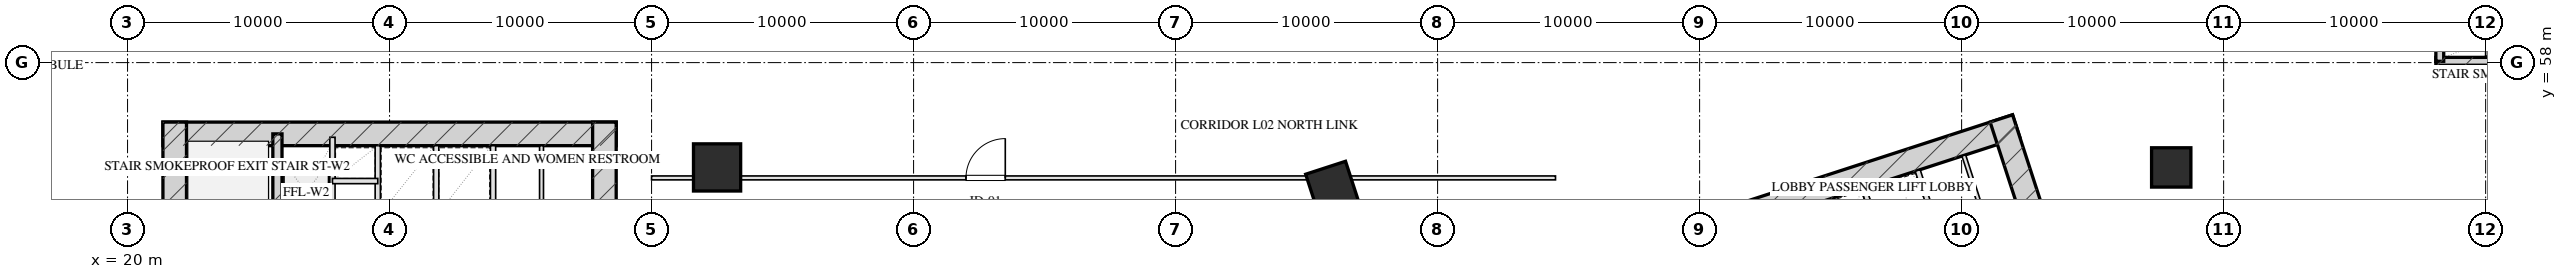
"""IFC4 building model, lengths in metres.
Left out: names, types, materials, properties, quantities, classifications, styles, units other than length and angle.
Written with IfcOpenShell. Run it as: python <this file> out.ifc"""

import sys

from ifc_helpers import new_model, si_unit, direction, frame, frame_2d, origin, origin_2d, place, context, subcontext, project, spatial, rectangle, hollow_rectangle, extrude, element, fill, save


model = new_model("IFC4")
c1 = context("Model", 3, precision=1e-05, world=origin(), true_north=direction((0.0, 1.0)))
c2 = subcontext(c1, "Body", "Model", "MODEL_VIEW")
j1 = project(units=[si_unit("LENGTHUNIT", "METRE"), si_unit("PLANEANGLEUNIT", "RADIAN")], contexts=[c1])
p1 = place(None, origin())
s1 = spatial("IfcSite", under=j1, at=p1, CompositionType="ELEMENT")
p2 = place(p1, origin())
s2 = spatial("IfcBuilding", under=s1, at=p2, CompositionType="ELEMENT")
p3 = place(p2, frame((0.0, 0.0, 11.5)))
s3 = spatial("IfcBuildingStorey", under=s2, at=p3, CompositionType="ELEMENT", Elevation=11.5)
p4 = place(p3, frame((21.35, 55.28, 0.0), z_axis=(0.0, 0.0, 1.0), x_axis=(1.0, 0.0, 0.0)))
e1 = element("IfcWall", 1, at=p4, inside=s3, PredefinedType="SHEAR", context=c2, shape_type="SweptSolid", body=[
    extrude(rectangle(XDim=17.3, YDim=0.9, at=frame_2d((8.65, 0.0))), origin(), (0.0, 0.0, 1.0), 5.0),
])
for number, where, z_axis, x_axis in (
    (2, (21.8, 45.95, 0.0), (0.0, 0.0, 1.0), (0.0, 1.0, 0.0)),
    (3, (38.2, 45.95, 0.0), (0.0, 0.0, 1.0), (0.0, 1.0, 0.0)),
):
    element("IfcWall", number, at=place(p3, frame(where, z_axis=z_axis, x_axis=x_axis)), inside=s3, PredefinedType="SHEAR", context=c2, shape_type="SweptSolid", body=[
        extrude(rectangle(XDim=9.78, YDim=0.9, at=frame_2d((4.89, 0.0))), origin(), (0.0, 0.0, 1.0), 5.0),
    ])
p5 = place(p3, frame((25.72, 48.3, 0.0), z_axis=(0.0, 0.0, 1.0), x_axis=(0.0, 1.0, 0.0)))
e4 = element("IfcWall", 4, at=p5, inside=s3, PredefinedType="SHEAR", context=c2, shape_type="SweptSolid", body=[
    extrude(rectangle(XDim=6.98, YDim=0.35, at=frame_2d((3.49, 0.0))), origin(), (0.0, 0.0, 1.0), 5.0),
])
p6 = place(p3, frame((76.201, 50.419, 0.0), z_axis=(0.0, 0.0, 1.0), x_axis=(0.951056412142, 0.309017314926, 0.0)))
e5 = element("IfcWall", 5, at=p6, inside=s3, PredefinedType="SHEAR", context=c2, shape_type="SweptSolid", body=[
    extrude(rectangle(XDim=16.7, YDim=0.9, at=frame_2d((8.35, 0.0))), origin(), (0.0, 0.0, 1.0), 5.0),
])
p7 = place(p3, frame((94.539, 46.568, 0.0), z_axis=(0.0, 0.0, 1.0), x_axis=(-0.309021722829, 0.951054979914, 0.0)))
e6 = element("IfcWall", 6, at=p7, inside=s3, PredefinedType="SHEAR", context=c2, shape_type="SweptSolid", body=[
    extrude(rectangle(XDim=9.78, YDim=0.9, at=frame_2d((4.89, 0.0))), origin(), (0.0, 0.0, 1.0), 5.0),
])
p8 = place(p3, frame((108.1, 58.05, 0.0), z_axis=(0.0, 0.0, 1.0), x_axis=(1.0, 0.0, 0.0)))
e7 = element("IfcWall", 7, at=p8, inside=s3, PredefinedType="SHEAR", context=c2, shape_type="SweptSolid", body=[
    extrude(rectangle(XDim=8.9, YDim=0.3, at=frame_2d((4.45, 0.0))), origin(), (0.0, 0.0, 1.0), 5.0),
])
p9 = place(p3, frame((108.25, 58.05, 0.0), z_axis=(0.0, 0.0, 1.0), x_axis=(0.0, 1.0, 0.0)))
e8 = element("IfcWall", 8, at=p9, inside=s3, PredefinedType="SHEAR", context=c2, shape_type="SweptSolid", body=[
    extrude(rectangle(XDim=3.4, YDim=0.3, at=frame_2d((1.7, 0.0))), origin(), (0.0, 0.0, 1.0), 5.0),
])
p10 = place(p9, frame((0.65, 0.0, 0.0)))
e9 = element("IfcOpeningElement", 9, at=p10, cuts=e8, PredefinedType="OPENING", context=c2, shape_type="SweptSolid", body=[
    extrude(rectangle(XDim=1.2, YDim=2.05, at=frame_2d((0.6, 1.025))), frame((0.0, 0.16, 0.0), z_axis=(0.0, -1.0, 0.0), x_axis=(1.0, 0.0, 0.0)), (0.0, 0.0, 1.0), 0.32),
])
p11 = place(p3, frame((42.5, 54.0, 0.0), z_axis=(0.0, 0.0, 1.0), x_axis=(1.0, 0.0, 0.0)))
e10 = element("IfcColumn", 10, at=p11, inside=s3, PredefinedType="COLUMN", context=c2, shape_type="SweptSolid", body=[
    extrude(hollow_rectangle(XDim=1.8, YDim=1.8, WallThickness=0.06, at=origin_2d()), origin(), (0.0, 0.0, 1.0), 5.001),
])
p12 = place(p3, frame((98.0, 54.0, 0.0), z_axis=(0.0, 0.0, 1.0), x_axis=(1.0, 0.0, 0.0)))
e11 = element("IfcColumn", 11, at=p12, inside=s3, PredefinedType="COLUMN", context=c2, shape_type="SweptSolid", body=[
    extrude(rectangle(XDim=1.5, YDim=1.5, at=origin_2d()), origin(), (0.0, 0.0, 1.0), 5.001),
])
p13 = place(p3, frame((65.973, 53.226, 0.0), z_axis=(0.0, 0.0, 1.0), x_axis=(0.951056516295, 0.309016994375, 0.0)))
e12 = element("IfcColumn", 12, at=p13, inside=s3, PredefinedType="COLUMN", context=c2, shape_type="SweptSolid", body=[
    extrude(hollow_rectangle(XDim=1.6, YDim=1.6, WallThickness=0.055, at=origin_2d()), origin(), (0.0, 0.0, 1.0), 5.001),
])
p14 = place(p3, frame((29.55, 46.4, 0.0), z_axis=(0.0, 0.0, 1.0), x_axis=(0.0, 1.0, 0.0)))
e13 = element("IfcWall", 13, at=p14, inside=s3, PredefinedType="PARTITIONING", context=c2, shape_type="SweptSolid", body=[
    extrude(rectangle(XDim=8.43, YDim=0.2, at=frame_2d((4.215, 0.0))), origin(), (0.0, 0.0, 1.0), 4.685),
])
p15 = place(p3, frame((27.82, 51.45, 0.0), z_axis=(0.0, 0.0, 1.0), x_axis=(0.0, 1.0, 0.0)))
e14 = element("IfcWall", 14, at=p15, inside=s3, PredefinedType="PARTITIONING", context=c2, shape_type="SweptSolid", body=[
    extrude(rectangle(XDim=3.7, YDim=0.2, at=frame_2d((1.85, 0.0))), origin(), (0.0, 0.0, 1.0), 4.685),
])
p16 = place(p3, frame((27.82, 53.48, 0.0), z_axis=(0.0, 0.0, 1.0), x_axis=(1.0, 0.0, 0.0)))
e15 = element("IfcWall", 15, at=p16, inside=s3, PredefinedType="PARTITIONING", context=c2, shape_type="SweptSolid", body=[
    extrude(rectangle(XDim=1.73, YDim=0.2, at=frame_2d((0.865, 0.0))), origin(), (0.0, 0.0, 1.0), 4.685),
])
p17 = place(p3, frame((33.95, 46.4, 0.0), z_axis=(0.0, 0.0, 1.0), x_axis=(0.0, 1.0, 0.0)))
e16 = element("IfcWall", 16, at=p17, inside=s3, PredefinedType="PARTITIONING", context=c2, shape_type="SweptSolid", body=[
    extrude(rectangle(XDim=8.43, YDim=0.2, at=frame_2d((4.215, 0.0))), origin(), (0.0, 0.0, 1.0), 4.685),
])
p18 = place(p3, frame((31.78, 49.72, 0.0), z_axis=(0.0, 0.0, 1.0), x_axis=(0.0, 1.0, 0.0)))
e17 = element("IfcWall", 17, at=p18, inside=s3, PredefinedType="PARTITIONING", context=c2, shape_type="SweptSolid", body=[
    extrude(rectangle(XDim=5.11, YDim=0.2, at=frame_2d((2.555, 0.0))), origin(), (0.0, 0.0, 1.0), 4.685),
])
p19 = place(p3, frame((35.8, 49.1, 0.0), z_axis=(0.0, 0.0, 1.0), x_axis=(0.0, 1.0, 0.0)))
e18 = element("IfcWall", 18, at=p19, inside=s3, PredefinedType="PARTITIONING", context=c2, shape_type="SweptSolid", body=[
    extrude(rectangle(XDim=5.73, YDim=0.15, at=frame_2d((2.865, 0.0))), origin(), (0.0, 0.0, 1.0), 4.685),
])
p20 = place(p3, frame((90.928, 45.868, 0.0), z_axis=(0.0, 0.0, 1.0), x_axis=(-0.309042196757, 0.951048327176, 0.0)))
e19 = element("IfcWall", 19, at=p20, inside=s3, PredefinedType="PARTITIONING", context=c2, shape_type="SweptSolid", body=[
    extrude(rectangle(XDim=8.43, YDim=0.2, at=frame_2d((4.215, 0.0))), origin(), (0.0, 0.0, 1.0), 4.685),
])
p21 = place(p3, frame((87.838, 48.354, 0.0), z_axis=(0.0, 0.0, 1.0), x_axis=(-0.3090093719, 0.951058992953, 0.0)))
e20 = element("IfcWall", 20, at=p21, inside=s3, PredefinedType="PARTITIONING", context=c2, shape_type="SweptSolid", body=[
    extrude(rectangle(XDim=5.11, YDim=0.2, at=frame_2d((2.555, 0.0))), origin(), (0.0, 0.0, 1.0), 4.685),
])
p22 = place(p3, frame((91.853, 49.007, 0.0), z_axis=(0.0, 0.0, 1.0), x_axis=(-0.309022487551, 0.951054731437, 0.0)))
e21 = element("IfcWall", 21, at=p22, inside=s3, PredefinedType="PARTITIONING", context=c2, shape_type="SweptSolid", body=[
    extrude(rectangle(XDim=5.73, YDim=0.15, at=frame_2d((2.865, 0.0))), origin(), (0.0, 0.0, 1.0), 4.685),
])
p23 = place(p3, frame((40.0, 53.6, 0.0), z_axis=(0.0, 0.0, 1.0), x_axis=(1.0, 0.0, 0.0)))
e22 = element("IfcWall", 22, at=p23, inside=s3, PredefinedType="PARTITIONING", context=c2, shape_type="SweptSolid", body=[
    extrude(rectangle(XDim=34.5, YDim=0.15, at=frame_2d((17.25, 0.0))), origin(), (0.0, 0.0, 1.0), 4.685),
])
p24 = place(p23, frame((12.0, 0.0, 0.0)))
e23 = element("IfcOpeningElement", 23, at=p24, cuts=e22, PredefinedType="OPENING", context=c2, shape_type="SweptSolid", body=[
    extrude(rectangle(XDim=1.5, YDim=2.05, at=frame_2d((0.75, 1.025))), frame((0.0, 0.085, 0.0), z_axis=(0.0, -1.0, 0.0), x_axis=(1.0, 0.0, 0.0)), (0.0, 0.0, 1.0), 0.17),
])
p25 = place(p24, origin())
e24 = element("IfcDoor", 24, at=p25, inside=s3, OperationType="SINGLE_SWING_RIGHT", PredefinedType="DOOR", context=c2, shape_type="SweptSolid", body=[
    extrude(rectangle(XDim=1.5, YDim=2.05, at=frame_2d((0.75, 1.025))), frame((0.0, 0.025, 0.0), z_axis=(0.0, -1.0, 0.0), x_axis=(1.0, 0.0, 0.0)), (0.0, 0.0, 1.0), 0.05),
])
fill(e23, e24)
save(model, sys.argv[1])
